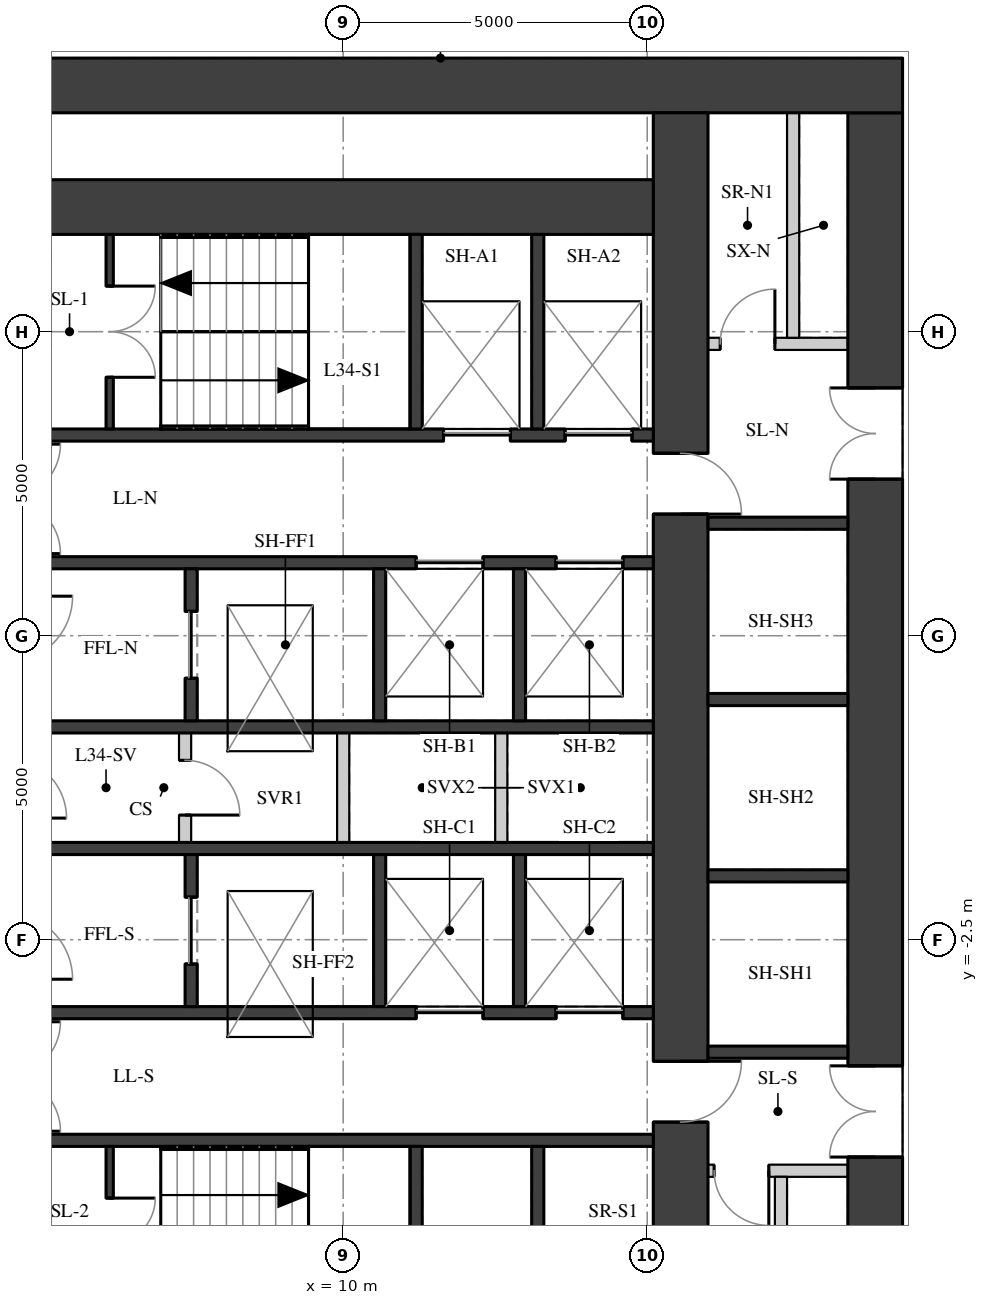
"""IFC4 building model, lengths in metres.
Left out: names, types, materials, properties, quantities, classifications, styles, units other than length and angle.
Written with IfcOpenShell. Run it as: python <this file> out.ifc"""

import sys

from ifc_helpers import new_model, si_unit, direction, frame, frame_2d, origin, place, context, subcontext, project, spatial, rectangle, extrude, element, fill, save


model = new_model("IFC4")
c1 = context("Model", 3, precision=1e-05, world=origin(), true_north=direction((0.0, 1.0)))
c2 = subcontext(c1, "Body", "Model", "MODEL_VIEW")
j1 = project(units=[si_unit("LENGTHUNIT", "METRE"), si_unit("PLANEANGLEUNIT", "RADIAN")], contexts=[c1])
p1 = place(None, origin())
s1 = spatial("IfcSite", under=j1, at=p1, CompositionType="ELEMENT")
p2 = place(p1, origin())
s2 = spatial("IfcBuilding", under=s1, at=p2, CompositionType="ELEMENT")
p3 = place(p2, frame((0.0, 0.0, 121.9)))
s3 = spatial("IfcBuildingStorey", under=s2, at=p3, CompositionType="ELEMENT", Elevation=121.9)
p4 = place(p3, frame((18.75, -11.1, 0.0), z_axis=(0.0, 0.0, 1.0), x_axis=(0.0, 1.0, 0.0)))
e1 = element("IfcWall", 1, at=p4, inside=s3, PredefinedType="SHEAR", context=c2, shape_type="SweptSolid", body=[
    extrude(rectangle(XDim=22.2, YDim=0.9, at=frame_2d((11.1, 0.0))), origin(), (0.0, 0.0, 1.0), 3.02),
])
p5 = place(p4, frame((16.175, 0.0, 0.0)))
e2 = element("IfcOpeningElement", 2, at=p5, cuts=e1, PredefinedType="OPENING", context=c2, shape_type="SweptSolid", body=[
    extrude(rectangle(XDim=1.5, YDim=2.1, at=frame_2d((0.75, 1.05))), frame((0.0, 0.46, 0.0), z_axis=(0.0, -1.0, 0.0), x_axis=(1.0, 0.0, 0.0)), (0.0, 0.0, 1.0), 0.92),
])
p6 = place(p4, frame((5.025, 0.0, 0.0)))
e3 = element("IfcOpeningElement", 3, at=p6, cuts=e1, PredefinedType="OPENING", context=c2, shape_type="SweptSolid", body=[
    extrude(rectangle(XDim=1.5, YDim=2.1, at=frame_2d((0.75, 1.05))), frame((0.0, 0.46, 0.0), z_axis=(0.0, -1.0, 0.0), x_axis=(1.0, 0.0, 0.0)), (0.0, 0.0, 1.0), 0.92),
])
p7 = place(p3, frame((4.0, 11.55, 0.0), z_axis=(0.0, 0.0, 1.0), x_axis=(1.0, 0.0, 0.0)))
e4 = element("IfcWall", 4, at=p7, inside=s3, PredefinedType="SHEAR", context=c2, shape_type="SweptSolid", body=[
    extrude(rectangle(XDim=15.2, YDim=0.9, at=frame_2d((7.6, 0.0))), origin(), (0.0, 0.0, 1.0), 3.02),
])
p8 = place(p3, frame((15.55, -11.1, 0.0), z_axis=(0.0, 0.0, 1.0), x_axis=(0.0, 1.0, 0.0)))
e5 = element("IfcWall", 5, at=p8, inside=s3, PredefinedType="SHEAR", context=c2, shape_type="SweptSolid", body=[
    extrude(rectangle(XDim=22.2, YDim=0.9, at=frame_2d((11.1, 0.0))), origin(), (0.0, 0.0, 1.0), 3.02),
])
p9 = place(p8, frame((15.6, 0.0, 0.0)))
e6 = element("IfcOpeningElement", 6, at=p9, cuts=e5, PredefinedType="OPENING", context=c2, shape_type="SweptSolid", body=[
    extrude(rectangle(XDim=1.0, YDim=2.1, at=frame_2d((0.5, 1.05))), frame((0.0, 0.46, 0.0), z_axis=(0.0, -1.0, 0.0), x_axis=(1.0, 0.0, 0.0)), (0.0, 0.0, 1.0), 0.92),
])
p10 = place(p8, frame((5.6, 0.0, 0.0)))
e7 = element("IfcOpeningElement", 7, at=p10, cuts=e5, PredefinedType="OPENING", context=c2, shape_type="SweptSolid", body=[
    extrude(rectangle(XDim=1.0, YDim=2.1, at=frame_2d((0.5, 1.05))), frame((0.0, 0.46, 0.0), z_axis=(0.0, -1.0, 0.0), x_axis=(1.0, 0.0, 0.0)), (0.0, 0.0, 1.0), 0.92),
])
p11 = place(p3, frame((4.9, 9.55, 0.0), z_axis=(0.0, 0.0, 1.0), x_axis=(1.0, 0.0, 0.0)))
e8 = element("IfcWall", 8, at=p11, inside=s3, PredefinedType="SHEAR", context=c2, shape_type="SweptSolid", body=[
    extrude(rectangle(XDim=10.2, YDim=0.9, at=frame_2d((5.1, 0.0))), origin(), (0.0, 0.0, 1.0), 3.02),
])
p12 = place(p3, frame((4.9, 5.8, 0.0), z_axis=(0.0, 0.0, 1.0), x_axis=(1.0, 0.0, 0.0)))
e9 = element("IfcWall", 9, at=p12, inside=s3, PredefinedType="SHEAR", context=c2, shape_type="SweptSolid", body=[
    extrude(rectangle(XDim=10.2, YDim=0.2, at=frame_2d((5.1, 0.0))), origin(), (0.0, 0.0, 1.0), 3.02),
])
p13 = place(p12, frame((6.75, 0.0, 0.0)))
e10 = element("IfcOpeningElement", 10, at=p13, cuts=e9, PredefinedType="OPENING", context=c2, shape_type="SweptSolid", body=[
    extrude(rectangle(XDim=1.1, YDim=2.1, at=frame_2d((0.55, 1.05))), frame((0.0, 0.11, 0.0), z_axis=(0.0, -1.0, 0.0), x_axis=(1.0, 0.0, 0.0)), (0.0, 0.0, 1.0), 0.22),
])
p14 = place(p12, frame((8.75, 0.0, 0.0)))
e11 = element("IfcOpeningElement", 11, at=p14, cuts=e9, PredefinedType="OPENING", context=c2, shape_type="SweptSolid", body=[
    extrude(rectangle(XDim=1.1, YDim=2.1, at=frame_2d((0.55, 1.05))), frame((0.0, 0.11, 0.0), z_axis=(0.0, -1.0, 0.0), x_axis=(1.0, 0.0, 0.0)), (0.0, 0.0, 1.0), 0.22),
])
p15 = place(p3, frame((4.9, 3.7, 0.0), z_axis=(0.0, 0.0, 1.0), x_axis=(1.0, 0.0, 0.0)))
e12 = element("IfcWall", 12, at=p15, inside=s3, PredefinedType="SHEAR", context=c2, shape_type="SweptSolid", body=[
    extrude(rectangle(XDim=10.2, YDim=0.2, at=frame_2d((5.1, 0.0))), origin(), (0.0, 0.0, 1.0), 3.02),
])
p16 = place(p15, frame((6.3, 0.0, 0.0)))
e13 = element("IfcOpeningElement", 13, at=p16, cuts=e12, PredefinedType="OPENING", context=c2, shape_type="SweptSolid", body=[
    extrude(rectangle(XDim=1.1, YDim=2.1, at=frame_2d((0.55, 1.05))), frame((0.0, 0.11, 0.0), z_axis=(0.0, -1.0, 0.0), x_axis=(1.0, 0.0, 0.0)), (0.0, 0.0, 1.0), 0.22),
])
p17 = place(p15, frame((8.6, 0.0, 0.0)))
e14 = element("IfcOpeningElement", 14, at=p17, cuts=e12, PredefinedType="OPENING", context=c2, shape_type="SweptSolid", body=[
    extrude(rectangle(XDim=1.1, YDim=2.1, at=frame_2d((0.55, 1.05))), frame((0.0, 0.11, 0.0), z_axis=(0.0, -1.0, 0.0), x_axis=(1.0, 0.0, 0.0)), (0.0, 0.0, 1.0), 0.22),
])
for number, where, z_axis, x_axis in (
    (15, (4.9, 1.0, 0.0), (0.0, 0.0, 1.0), (1.0, 0.0, 0.0)),
    (16, (4.9, -1.0, 0.0), (0.0, 0.0, 1.0), (1.0, 0.0, 0.0)),
):
    element("IfcWall", number, at=place(p3, frame(where, z_axis=z_axis, x_axis=x_axis)), inside=s3, PredefinedType="SHEAR", context=c2, shape_type="SweptSolid", body=[
        extrude(rectangle(XDim=10.2, YDim=0.2, at=frame_2d((5.1, 0.0))), origin(), (0.0, 0.0, 1.0), 3.02),
    ])
p18 = place(p3, frame((4.9, -3.7, 0.0), z_axis=(0.0, 0.0, 1.0), x_axis=(1.0, 0.0, 0.0)))
e17 = element("IfcWall", 17, at=p18, inside=s3, PredefinedType="SHEAR", context=c2, shape_type="SweptSolid", body=[
    extrude(rectangle(XDim=10.2, YDim=0.2, at=frame_2d((5.1, 0.0))), origin(), (0.0, 0.0, 1.0), 3.02),
])
p19 = place(p18, frame((6.3, 0.0, 0.0)))
e18 = element("IfcOpeningElement", 18, at=p19, cuts=e17, PredefinedType="OPENING", context=c2, shape_type="SweptSolid", body=[
    extrude(rectangle(XDim=1.1, YDim=2.1, at=frame_2d((0.55, 1.05))), frame((0.0, 0.11, 0.0), z_axis=(0.0, -1.0, 0.0), x_axis=(1.0, 0.0, 0.0)), (0.0, 0.0, 1.0), 0.22),
])
p20 = place(p18, frame((8.6, 0.0, 0.0)))
e19 = element("IfcOpeningElement", 19, at=p20, cuts=e17, PredefinedType="OPENING", context=c2, shape_type="SweptSolid", body=[
    extrude(rectangle(XDim=1.1, YDim=2.1, at=frame_2d((0.55, 1.05))), frame((0.0, 0.11, 0.0), z_axis=(0.0, -1.0, 0.0), x_axis=(1.0, 0.0, 0.0)), (0.0, 0.0, 1.0), 0.22),
])
p21 = place(p3, frame((4.9, -5.8, 0.0), z_axis=(0.0, 0.0, 1.0), x_axis=(1.0, 0.0, 0.0)))
e20 = element("IfcWall", 20, at=p21, inside=s3, PredefinedType="SHEAR", context=c2, shape_type="SweptSolid", body=[
    extrude(rectangle(XDim=10.2, YDim=0.2, at=frame_2d((5.1, 0.0))), origin(), (0.0, 0.0, 1.0), 3.02),
])
for number, where, z_axis, x_axis in (
    (21, (11.2, 5.9, 0.0), (0.0, 0.0, 1.0), (0.0, 1.0, 0.0)),
    (22, (11.2, -9.1, 0.0), (0.0, 0.0, 1.0), (0.0, 1.0, 0.0)),
    (23, (13.2, 5.9, 0.0), (0.0, 0.0, 1.0), (0.0, 1.0, 0.0)),
    (24, (13.2, -9.1, 0.0), (0.0, 0.0, 1.0), (0.0, 1.0, 0.0)),
):
    element("IfcWall", number, at=place(p3, frame(where, z_axis=z_axis, x_axis=x_axis)), inside=s3, PredefinedType="SHEAR", context=c2, shape_type="SweptSolid", body=[
        extrude(rectangle(XDim=3.2, YDim=0.2, at=frame_2d((1.6, 0.0))), origin(), (0.0, 0.0, 1.0), 3.02),
    ])
p22 = place(p3, frame((7.5, 1.1, 0.0), z_axis=(0.0, 0.0, 1.0), x_axis=(0.0, 1.0, 0.0)))
e25 = element("IfcWall", 25, at=p22, inside=s3, PredefinedType="SHEAR", context=c2, shape_type="SweptSolid", body=[
    extrude(rectangle(XDim=2.5, YDim=0.2, at=frame_2d((1.25, 0.0))), origin(), (0.0, 0.0, 1.0), 3.02),
])
p23 = place(p22, frame((0.7, 0.0, 0.0)))
e26 = element("IfcOpeningElement", 26, at=p23, cuts=e25, PredefinedType="OPENING", context=c2, shape_type="SweptSolid", body=[
    extrude(rectangle(XDim=1.1, YDim=2.1, at=frame_2d((0.55, 1.05))), frame((0.0, 0.11, 0.0), z_axis=(0.0, -1.0, 0.0), x_axis=(1.0, 0.0, 0.0)), (0.0, 0.0, 1.0), 0.22),
])
p24 = place(p3, frame((7.5, -3.6, 0.0), z_axis=(0.0, 0.0, 1.0), x_axis=(0.0, 1.0, 0.0)))
e27 = element("IfcWall", 27, at=p24, inside=s3, PredefinedType="SHEAR", context=c2, shape_type="SweptSolid", body=[
    extrude(rectangle(XDim=2.5, YDim=0.2, at=frame_2d((1.25, 0.0))), origin(), (0.0, 0.0, 1.0), 3.02),
])
p25 = place(p24, frame((0.7, 0.0, 0.0)))
e28 = element("IfcOpeningElement", 28, at=p25, cuts=e27, PredefinedType="OPENING", context=c2, shape_type="SweptSolid", body=[
    extrude(rectangle(XDim=1.1, YDim=2.1, at=frame_2d((0.55, 1.05))), frame((0.0, 0.11, 0.0), z_axis=(0.0, -1.0, 0.0), x_axis=(1.0, 0.0, 0.0)), (0.0, 0.0, 1.0), 0.22),
])
for number, where, z_axis, x_axis in (
    (29, (10.6, 1.1, 0.0), (0.0, 0.0, 1.0), (0.0, 1.0, 0.0)),
    (30, (10.6, -3.6, 0.0), (0.0, 0.0, 1.0), (0.0, 1.0, 0.0)),
    (31, (12.9, 1.1, 0.0), (0.0, 0.0, 1.0), (0.0, 1.0, 0.0)),
    (32, (12.9, -3.6, 0.0), (0.0, 0.0, 1.0), (0.0, 1.0, 0.0)),
):
    element("IfcWall", number, at=place(p3, frame(where, z_axis=z_axis, x_axis=x_axis)), inside=s3, PredefinedType="SHEAR", context=c2, shape_type="SweptSolid", body=[
        extrude(rectangle(XDim=2.5, YDim=0.2, at=frame_2d((1.25, 0.0))), origin(), (0.0, 0.0, 1.0), 3.02),
    ])
p26 = place(p3, frame((6.16, 5.9, 0.0), z_axis=(0.0, 0.0, 1.0), x_axis=(0.0, 1.0, 0.0)))
e33 = element("IfcWall", 33, at=p26, inside=s3, PredefinedType="SHEAR", context=c2, shape_type="SweptSolid", body=[
    extrude(rectangle(XDim=3.2, YDim=0.12, at=frame_2d((1.6, 0.0))), origin(), (0.0, 0.0, 1.0), 3.02),
])
p27 = place(p26, frame((0.85, 0.0, 0.0)))
e34 = element("IfcOpeningElement", 34, at=p27, cuts=e33, PredefinedType="OPENING", context=c2, shape_type="SweptSolid", body=[
    extrude(rectangle(XDim=1.5, YDim=2.1, at=frame_2d((0.75, 1.05))), frame((0.0, 0.07, 0.0), z_axis=(0.0, -1.0, 0.0), x_axis=(1.0, 0.0, 0.0)), (0.0, 0.0, 1.0), 0.14),
])
p28 = place(p3, frame((6.16, -9.1, 0.0), z_axis=(0.0, 0.0, 1.0), x_axis=(0.0, 1.0, 0.0)))
e35 = element("IfcWall", 35, at=p28, inside=s3, PredefinedType="SHEAR", context=c2, shape_type="SweptSolid", body=[
    extrude(rectangle(XDim=3.2, YDim=0.12, at=frame_2d((1.6, 0.0))), origin(), (0.0, 0.0, 1.0), 3.02),
])
p29 = place(p28, frame((0.85, 0.0, 0.0)))
e36 = element("IfcOpeningElement", 36, at=p29, cuts=e35, PredefinedType="OPENING", context=c2, shape_type="SweptSolid", body=[
    extrude(rectangle(XDim=1.5, YDim=2.1, at=frame_2d((0.75, 1.05))), frame((0.0, 0.07, 0.0), z_axis=(0.0, -1.0, 0.0), x_axis=(1.0, 0.0, 0.0)), (0.0, 0.0, 1.0), 0.14),
])
p30 = place(p3, frame((7.4, -0.9, 0.0), z_axis=(0.0, 0.0, 1.0), x_axis=(0.0, 1.0, 0.0)))
e37 = element("IfcWall", 37, at=p30, inside=s3, PredefinedType="PARTITIONING", context=c2, shape_type="SweptSolid", body=[
    extrude(rectangle(XDim=1.8, YDim=0.2, at=frame_2d((0.9, 0.0))), origin(), (0.0, 0.0, 1.0), 3.02),
])
p31 = place(p30, frame((0.45, 0.0, 0.0)))
e38 = element("IfcOpeningElement", 38, at=p31, cuts=e37, PredefinedType="OPENING", context=c2, shape_type="SweptSolid", body=[
    extrude(rectangle(XDim=0.9, YDim=2.1, at=frame_2d((0.45, 1.05))), frame((0.0, 0.11, 0.0), z_axis=(0.0, -1.0, 0.0), x_axis=(1.0, 0.0, 0.0)), (0.0, 0.0, 1.0), 0.22),
])
for number, where, z_axis, x_axis in (
    (39, (10.0, -0.9, 0.0), (0.0, 0.0, 1.0), (0.0, 1.0, 0.0)),
    (40, (12.6, -0.9, 0.0), (0.0, 0.0, 1.0), (0.0, 1.0, 0.0)),
):
    element("IfcWall", number, at=place(p3, frame(where, z_axis=z_axis, x_axis=x_axis)), inside=s3, PredefinedType="PARTITIONING", context=c2, shape_type="SweptSolid", body=[
        extrude(rectangle(XDim=1.8, YDim=0.2, at=frame_2d((0.9, 0.0))), origin(), (0.0, 0.0, 1.0), 3.02),
    ])
for number, where, z_axis, x_axis in (
    (41, (16.0, -4.35, 0.0), (0.0, 0.0, 1.0), (1.0, 0.0, 0.0)),
    (42, (16.0, -1.45, 0.0), (0.0, 0.0, 1.0), (1.0, 0.0, 0.0)),
    (43, (16.0, 1.45, 0.0), (0.0, 0.0, 1.0), (1.0, 0.0, 0.0)),
    (44, (16.0, 4.35, 0.0), (0.0, 0.0, 1.0), (1.0, 0.0, 0.0)),
):
    element("IfcWall", number, at=place(p3, frame(where, z_axis=z_axis, x_axis=x_axis)), inside=s3, PredefinedType="SHEAR", context=c2, shape_type="SweptSolid", body=[
        extrude(rectangle(XDim=2.3, YDim=0.2, at=frame_2d((1.15, 0.0))), origin(), (0.0, 0.0, 1.0), 3.02),
    ])
p32 = place(p3, frame((16.0, 7.3, 0.0), z_axis=(0.0, 0.0, 1.0), x_axis=(1.0, 0.0, 0.0)))
e45 = element("IfcWall", 45, at=p32, inside=s3, PredefinedType="PARTITIONING", context=c2, shape_type="SweptSolid", body=[
    extrude(rectangle(XDim=2.3, YDim=0.2, at=frame_2d((1.15, 0.0))), origin(), (0.0, 0.0, 1.0), 3.02),
])
p33 = place(p32, frame((0.2, 0.0, 0.0)))
e46 = element("IfcOpeningElement", 46, at=p33, cuts=e45, PredefinedType="OPENING", context=c2, shape_type="SweptSolid", body=[
    extrude(rectangle(XDim=0.9, YDim=2.1, at=frame_2d((0.45, 1.05))), frame((0.0, 0.11, 0.0), z_axis=(0.0, -1.0, 0.0), x_axis=(1.0, 0.0, 0.0)), (0.0, 0.0, 1.0), 0.22),
])
p34 = place(p3, frame((17.4, 7.4, 0.0), z_axis=(0.0, 0.0, 1.0), x_axis=(0.0, 1.0, 0.0)))
e47 = element("IfcWall", 47, at=p34, inside=s3, PredefinedType="PARTITIONING", context=c2, shape_type="SweptSolid", body=[
    extrude(rectangle(XDim=3.7, YDim=0.2, at=frame_2d((1.85, 0.0))), origin(), (0.0, 0.0, 1.0), 3.02),
])
p35 = place(p3, frame((16.0, -6.3, 0.0), z_axis=(0.0, 0.0, 1.0), x_axis=(1.0, 0.0, 0.0)))
e48 = element("IfcWall", 48, at=p35, inside=s3, PredefinedType="PARTITIONING", context=c2, shape_type="SweptSolid", body=[
    extrude(rectangle(XDim=2.3, YDim=0.2, at=frame_2d((1.15, 0.0))), origin(), (0.0, 0.0, 1.0), 3.02),
])
p36 = place(p35, frame((0.1, 0.0, 0.0)))
e49 = element("IfcOpeningElement", 49, at=p36, cuts=e48, PredefinedType="OPENING", context=c2, shape_type="SweptSolid", body=[
    extrude(rectangle(XDim=0.9, YDim=2.1, at=frame_2d((0.45, 1.05))), frame((0.0, 0.11, 0.0), z_axis=(0.0, -1.0, 0.0), x_axis=(1.0, 0.0, 0.0)), (0.0, 0.0, 1.0), 0.22),
])
p37 = place(p3, frame((17.2, -11.1, 0.0), z_axis=(0.0, 0.0, 1.0), x_axis=(0.0, 1.0, 0.0)))
e50 = element("IfcWall", 50, at=p37, inside=s3, PredefinedType="PARTITIONING", context=c2, shape_type="SweptSolid", body=[
    extrude(rectangle(XDim=4.7, YDim=0.2, at=frame_2d((2.35, 0.0))), origin(), (0.0, 0.0, 1.0), 3.02),
])
p38 = place(p5, origin())
e51 = element("IfcDoor", 51, at=p38, inside=s3, OperationType="DOUBLE_DOOR_SINGLE_SWING", PredefinedType="DOOR", context=c2, shape_type="SweptSolid", body=[
    extrude(rectangle(XDim=1.5, YDim=2.1, at=frame_2d((0.75, 1.05))), frame((0.0, 0.025, 0.0), z_axis=(0.0, -1.0, 0.0), x_axis=(1.0, 0.0, 0.0)), (0.0, 0.0, 1.0), 0.05),
])
fill(e2, e51)
p39 = place(p6, origin())
e52 = element("IfcDoor", 52, at=p39, inside=s3, OperationType="DOUBLE_DOOR_SINGLE_SWING", PredefinedType="DOOR", context=c2, shape_type="SweptSolid", body=[
    extrude(rectangle(XDim=1.5, YDim=2.1, at=frame_2d((0.75, 1.05))), frame((0.0, 0.025, 0.0), z_axis=(0.0, -1.0, 0.0), x_axis=(1.0, 0.0, 0.0)), (0.0, 0.0, 1.0), 0.05),
])
fill(e3, e52)
p40 = place(p27, origin())
e53 = element("IfcDoor", 53, at=p40, inside=s3, OperationType="DOUBLE_DOOR_SINGLE_SWING", PredefinedType="DOOR", context=c2, shape_type="SweptSolid", body=[
    extrude(rectangle(XDim=1.5, YDim=2.1, at=frame_2d((0.75, 1.05))), frame((0.0, 0.025, 0.0), z_axis=(0.0, -1.0, 0.0), x_axis=(1.0, 0.0, 0.0)), (0.0, 0.0, 1.0), 0.05),
])
fill(e34, e53)
p41 = place(p29, origin())
e54 = element("IfcDoor", 54, at=p41, inside=s3, OperationType="DOUBLE_DOOR_SINGLE_SWING", PredefinedType="DOOR", context=c2, shape_type="SweptSolid", body=[
    extrude(rectangle(XDim=1.5, YDim=2.1, at=frame_2d((0.75, 1.05))), frame((0.0, 0.025, 0.0), z_axis=(0.0, -1.0, 0.0), x_axis=(1.0, 0.0, 0.0)), (0.0, 0.0, 1.0), 0.05),
])
fill(e36, e54)
p42 = place(p13, origin())
e55 = element("IfcDoor", 55, at=p42, inside=s3, OperationType="DOUBLE_DOOR_SLIDING", PredefinedType="DOOR", context=c2, shape_type="SweptSolid", body=[
    extrude(rectangle(XDim=1.1, YDim=2.1, at=frame_2d((0.55, 1.05))), frame((0.0, 0.025, 0.0), z_axis=(0.0, -1.0, 0.0), x_axis=(1.0, 0.0, 0.0)), (0.0, 0.0, 1.0), 0.05),
])
fill(e10, e55)
p43 = place(p14, origin())
e56 = element("IfcDoor", 56, at=p43, inside=s3, OperationType="DOUBLE_DOOR_SLIDING", PredefinedType="DOOR", context=c2, shape_type="SweptSolid", body=[
    extrude(rectangle(XDim=1.1, YDim=2.1, at=frame_2d((0.55, 1.05))), frame((0.0, 0.025, 0.0), z_axis=(0.0, -1.0, 0.0), x_axis=(1.0, 0.0, 0.0)), (0.0, 0.0, 1.0), 0.05),
])
fill(e11, e56)
p44 = place(p16, origin())
e57 = element("IfcDoor", 57, at=p44, inside=s3, OperationType="DOUBLE_DOOR_SLIDING", PredefinedType="DOOR", context=c2, shape_type="SweptSolid", body=[
    extrude(rectangle(XDim=1.1, YDim=2.1, at=frame_2d((0.55, 1.05))), frame((0.0, 0.025, 0.0), z_axis=(0.0, -1.0, 0.0), x_axis=(1.0, 0.0, 0.0)), (0.0, 0.0, 1.0), 0.05),
])
fill(e13, e57)
p45 = place(p17, origin())
e58 = element("IfcDoor", 58, at=p45, inside=s3, OperationType="DOUBLE_DOOR_SLIDING", PredefinedType="DOOR", context=c2, shape_type="SweptSolid", body=[
    extrude(rectangle(XDim=1.1, YDim=2.1, at=frame_2d((0.55, 1.05))), frame((0.0, 0.025, 0.0), z_axis=(0.0, -1.0, 0.0), x_axis=(1.0, 0.0, 0.0)), (0.0, 0.0, 1.0), 0.05),
])
fill(e14, e58)
p46 = place(p19, origin())
e59 = element("IfcDoor", 59, at=p46, inside=s3, OperationType="DOUBLE_DOOR_SLIDING", PredefinedType="DOOR", context=c2, shape_type="SweptSolid", body=[
    extrude(rectangle(XDim=1.1, YDim=2.1, at=frame_2d((0.55, 1.05))), frame((0.0, 0.025, 0.0), z_axis=(0.0, -1.0, 0.0), x_axis=(1.0, 0.0, 0.0)), (0.0, 0.0, 1.0), 0.05),
])
fill(e18, e59)
p47 = place(p20, origin())
e60 = element("IfcDoor", 60, at=p47, inside=s3, OperationType="DOUBLE_DOOR_SLIDING", PredefinedType="DOOR", context=c2, shape_type="SweptSolid", body=[
    extrude(rectangle(XDim=1.1, YDim=2.1, at=frame_2d((0.55, 1.05))), frame((0.0, 0.025, 0.0), z_axis=(0.0, -1.0, 0.0), x_axis=(1.0, 0.0, 0.0)), (0.0, 0.0, 1.0), 0.05),
])
fill(e19, e60)
p48 = place(p23, origin())
e61 = element("IfcDoor", 61, at=p48, inside=s3, OperationType="DOUBLE_DOOR_SLIDING", PredefinedType="DOOR", context=c2, shape_type="SweptSolid", body=[
    extrude(rectangle(XDim=1.1, YDim=2.1, at=frame_2d((0.55, 1.05))), frame((0.0, 0.025, 0.0), z_axis=(0.0, -1.0, 0.0), x_axis=(1.0, 0.0, 0.0)), (0.0, 0.0, 1.0), 0.05),
])
fill(e26, e61)
p49 = place(p25, origin())
e62 = element("IfcDoor", 62, at=p49, inside=s3, OperationType="DOUBLE_DOOR_SLIDING", PredefinedType="DOOR", context=c2, shape_type="SweptSolid", body=[
    extrude(rectangle(XDim=1.1, YDim=2.1, at=frame_2d((0.55, 1.05))), frame((0.0, 0.025, 0.0), z_axis=(0.0, -1.0, 0.0), x_axis=(1.0, 0.0, 0.0)), (0.0, 0.0, 1.0), 0.05),
])
fill(e28, e62)
p50 = place(p31, origin())
e63 = element("IfcDoor", 63, at=p50, inside=s3, OperationType="SINGLE_SWING_RIGHT", PredefinedType="DOOR", context=c2, shape_type="SweptSolid", body=[
    extrude(rectangle(XDim=0.9, YDim=2.1, at=frame_2d((0.45, 1.05))), frame((0.0, 0.025, 0.0), z_axis=(0.0, -1.0, 0.0), x_axis=(1.0, 0.0, 0.0)), (0.0, 0.0, 1.0), 0.05),
])
fill(e38, e63)
p51 = place(p9, origin())
e64 = element("IfcDoor", 64, at=p51, inside=s3, OperationType="SINGLE_SWING_RIGHT", PredefinedType="DOOR", context=c2, shape_type="SweptSolid", body=[
    extrude(rectangle(XDim=1.0, YDim=2.1, at=frame_2d((0.5, 1.05))), frame((0.0, 0.025, 0.0), z_axis=(0.0, -1.0, 0.0), x_axis=(1.0, 0.0, 0.0)), (0.0, 0.0, 1.0), 0.05),
])
fill(e6, e64)
p52 = place(p33, origin())
e65 = element("IfcDoor", 65, at=p52, inside=s3, OperationType="SINGLE_SWING_RIGHT", PredefinedType="DOOR", context=c2, shape_type="SweptSolid", body=[
    extrude(rectangle(XDim=0.9, YDim=2.1, at=frame_2d((0.45, 1.05))), frame((0.0, 0.025, 0.0), z_axis=(0.0, -1.0, 0.0), x_axis=(1.0, 0.0, 0.0)), (0.0, 0.0, 1.0), 0.05),
])
fill(e46, e65)
p53 = place(p10, origin())
e66 = element("IfcDoor", 66, at=p53, inside=s3, OperationType="SINGLE_SWING_LEFT", PredefinedType="DOOR", context=c2, shape_type="SweptSolid", body=[
    extrude(rectangle(XDim=1.0, YDim=2.1, at=frame_2d((0.5, 1.05))), frame((0.0, 0.025, 0.0), z_axis=(0.0, -1.0, 0.0), x_axis=(1.0, 0.0, 0.0)), (0.0, 0.0, 1.0), 0.05),
])
fill(e7, e66)
p54 = place(p36, origin())
e67 = element("IfcDoor", 67, at=p54, inside=s3, OperationType="SINGLE_SWING_LEFT", PredefinedType="DOOR", context=c2, shape_type="SweptSolid", body=[
    extrude(rectangle(XDim=0.9, YDim=2.1, at=frame_2d((0.45, 1.05))), frame((0.0, 0.025, 0.0), z_axis=(0.0, -1.0, 0.0), x_axis=(1.0, 0.0, 0.0)), (0.0, 0.0, 1.0), 0.05),
])
fill(e49, e67)
save(model, sys.argv[1])
